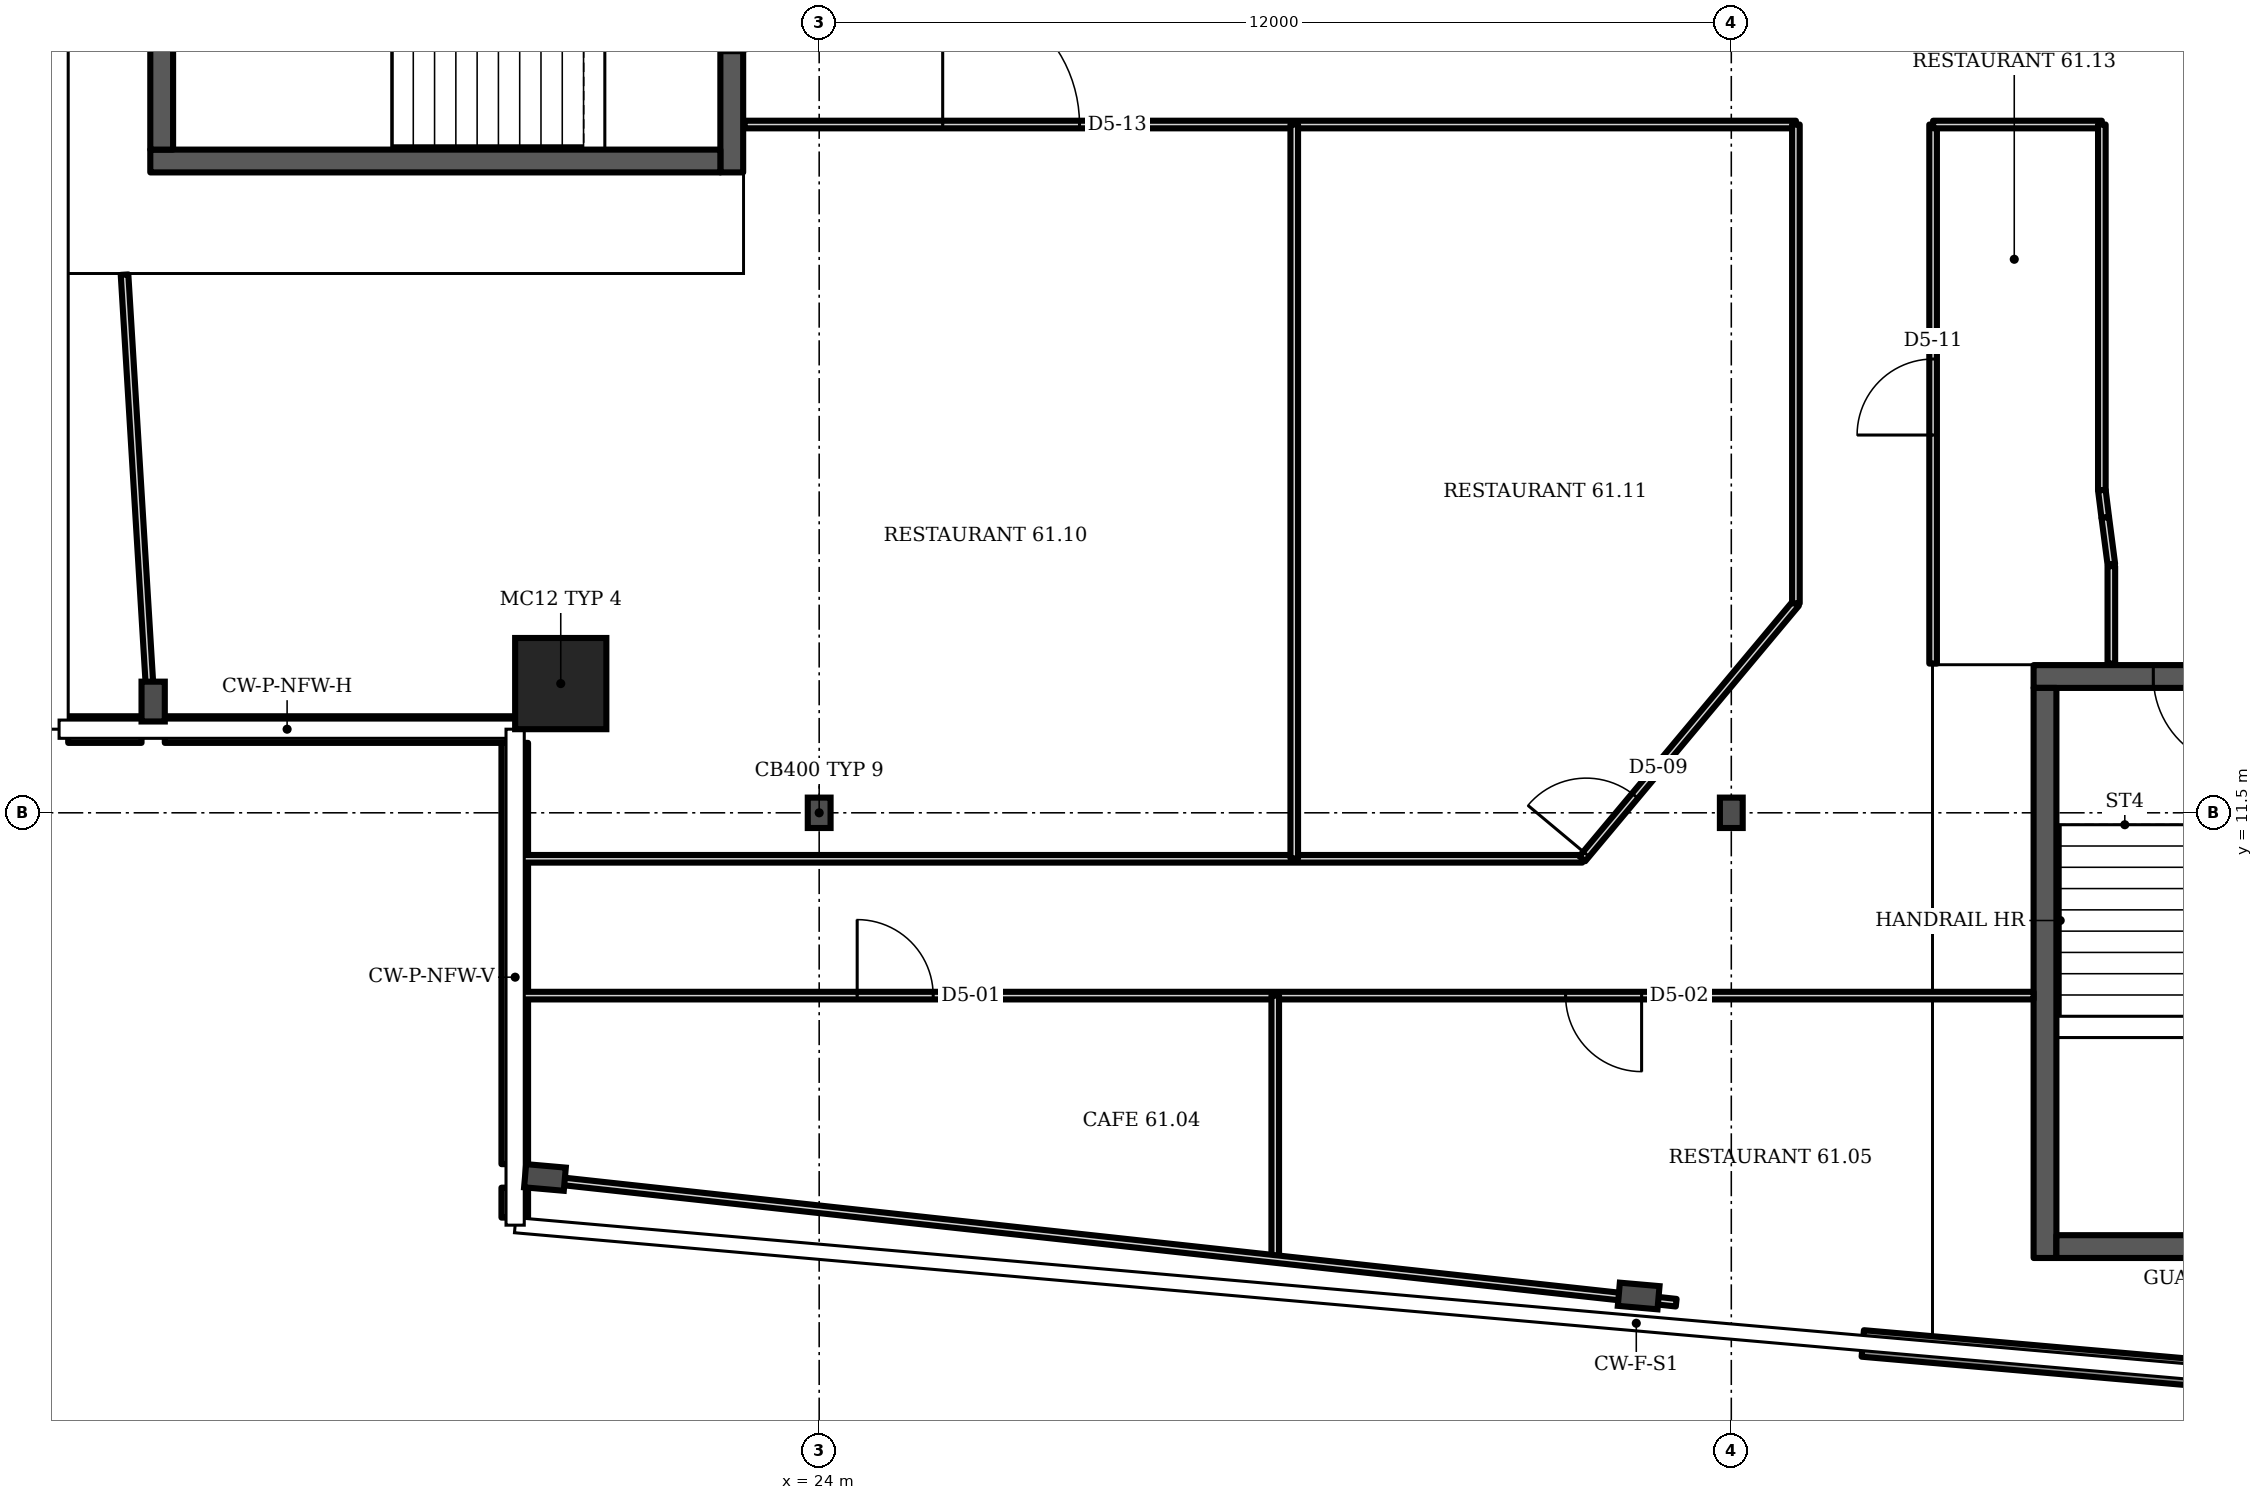
"""IFC4 building model, lengths in metres.
Left out: names, types, materials, properties, quantities, classifications, styles, units other than length and angle.
Written with IfcOpenShell. Run it as: python <this file> out.ifc"""

import sys

from ifc_helpers import new_model, si_unit, direction, frame, frame_2d, origin, origin_2d, place, context, subcontext, project, spatial, rectangle, i_section, extrude, element, fill, save


model = new_model("IFC4")
c1 = context("Model", 3, precision=1e-05, world=origin(), true_north=direction((0.0, 1.0)))
c2 = subcontext(c1, "Body", "Model", "MODEL_VIEW")
j1 = project(units=[si_unit("LENGTHUNIT", "METRE"), si_unit("PLANEANGLEUNIT", "RADIAN")], contexts=[c1])
p1 = place(None, origin())
s1 = spatial("IfcSite", under=j1, at=p1, CompositionType="ELEMENT")
p2 = place(p1, origin())
s2 = spatial("IfcBuilding", under=s1, at=p2, CompositionType="ELEMENT")
p3 = place(p2, frame((0.0, 0.0, 243.1)))
s3 = spatial("IfcBuildingStorey", under=s2, at=p3, CompositionType="ELEMENT", Elevation=243.1)
p4 = place(p3, frame((20.6, 13.2, 0.0), z_axis=(0.0, 0.0, 1.0), x_axis=(1.0, 0.0, 0.0)))
e1 = element("IfcColumn", 1, at=p4, inside=s3, PredefinedType="COLUMN", context=c2, shape_type="SweptSolid", body=[
    extrude(rectangle(XDim=1.2, YDim=1.2, at=origin_2d()), origin(), (0.0, 0.0, 1.0), 3.6),
])
for number, where, z_axis, x_axis in (
    (2, (20.392, 6.703, 0.0), (0.0, 0.0, 1.0), (-0.087, -0.996, 0.0)),
    (3, (34.781, 5.143, 0.0), (0.0, 0.0, 1.0), (-0.087, -0.996, 0.0)),
    (4, (15.238, 12.963, 0.0), (0.0, 0.0, 1.0), (-1.0, 0.0, 0.0)),
):
    element("IfcColumn", number, at=place(p3, frame(where, z_axis=z_axis, x_axis=x_axis)), inside=s3, PredefinedType="COLUMN", context=c2, shape_type="SweptSolid", body=[
        extrude(i_section(OverallWidth=0.306, OverallDepth=0.524, WebThickness=0.021, FlangeThickness=0.04, FilletRadius=0.027, at=origin_2d()), origin(), (0.0, 0.0, 1.0), 3.6),
    ])
for number, where, z_axis, x_axis in (
    (5, (24.0, 11.5, 0.0), (0.0, 0.0, 1.0), (1.0, 0.0, 0.0)),
    (6, (36.0, 11.5, 0.0), (0.0, 0.0, 1.0), (1.0, 0.0, 0.0)),
):
    element("IfcColumn", number, at=place(p3, frame(where, z_axis=z_axis, x_axis=x_axis)), inside=s3, PredefinedType="COLUMN", context=c2, shape_type="SweptSolid", body=[
        extrude(i_section(OverallWidth=0.3, OverallDepth=0.4, WebThickness=0.013, FlangeThickness=0.024, FilletRadius=0.027, at=origin_2d()), origin(), (0.0, 0.0, 1.0), 3.6),
    ])
p5 = place(p3, frame((37.729, 4.519, 0.0), z_axis=(0.0, 0.0, 1.0), x_axis=(0.99619, -0.087167, 0.0)))
e7 = element("IfcWall", 7, at=p5, inside=s3, PredefinedType="SOLIDWALL", context=c2, shape_type="SweptSolid", body=[
    extrude(rectangle(XDim=11.831, YDim=0.35, at=frame_2d((5.915, 0.0))), origin(), (0.0, 0.0, 1.0), 1.0),
])
p6 = place(p3, frame((14.12, 12.595, 0.0), z_axis=(0.0, 0.0, 1.0), x_axis=(1.0, 0.0, 0.0)))
e8 = element("IfcWall", 8, at=p6, inside=s3, PredefinedType="SOLIDWALL", context=c2, shape_type="SweptSolid", body=[
    extrude(rectangle(XDim=0.965, YDim=0.35, at=frame_2d((0.482, 0.0))), origin(), (0.0, 0.0, 1.0), 1.0),
])
p7 = place(p3, frame((15.391, 12.595, 0.0), z_axis=(0.0, 0.0, 1.0), x_axis=(1.0, 0.0, 0.0)))
e9 = element("IfcWall", 9, at=p7, inside=s3, PredefinedType="SOLIDWALL", context=c2, shape_type="SweptSolid", body=[
    extrude(rectangle(XDim=4.609, YDim=0.35, at=frame_2d((2.305, 0.0))), origin(), (0.0, 0.0, 1.0), 1.0),
])
p8 = place(p3, frame((19.995, 12.42, 0.0), z_axis=(0.0, 0.0, 1.0), x_axis=(0.0, -1.0, 0.0)))
e10 = element("IfcWall", 10, at=p8, inside=s3, PredefinedType="SOLIDWALL", context=c2, shape_type="SweptSolid", body=[
    extrude(rectangle(XDim=5.542, YDim=0.35, at=frame_2d((2.771, 0.0))), origin(), (0.0, 0.0, 1.0), 1.0),
])
p9 = place(p3, frame((19.995, 6.568, 0.0), z_axis=(0.0, 0.0, 1.0), x_axis=(0.0, -1.0, 0.0)))
e11 = element("IfcWall", 11, at=p9, inside=s3, PredefinedType="SOLIDWALL", context=c2, shape_type="SweptSolid", body=[
    extrude(rectangle(XDim=0.394, YDim=0.35, at=frame_2d((0.197, 0.0))), origin(), (0.0, 0.0, 1.0), 1.0),
])
p10 = place(p3, frame((22.85, 19.925, 0.0), z_axis=(0.0, 0.0, 1.0), x_axis=(0.0, 1.0, 0.0)))
e12 = element("IfcWall", 12, at=p10, inside=s3, PredefinedType="SHEAR", context=c2, shape_type="SweptSolid", body=[
    extrude(rectangle(XDim=4.35, YDim=0.3, at=frame_2d((2.175, 0.0))), origin(), (0.0, 0.0, 1.0), 3.2),
])
p11 = place(p10, frame((1.575, 0.0, 0.0)))
e13 = element("IfcOpeningElement", 13, at=p11, cuts=e12, PredefinedType="OPENING", context=c2, shape_type="SweptSolid", body=[
    extrude(rectangle(XDim=1.2, YDim=2.1, at=frame_2d((0.6, 1.05))), frame((0.0, 0.16, 0.0), z_axis=(0.0, -1.0, 0.0), x_axis=(1.0, 0.0, 0.0)), (0.0, 0.0, 1.0), 0.32),
])
p12 = place(p3, frame((39.977, 13.293, 0.0), z_axis=(0.0, 0.0, 1.0), x_axis=(1.0, 0.0, 0.0)))
e14 = element("IfcWall", 14, at=p12, inside=s3, PredefinedType="SHEAR", context=c2, shape_type="SweptSolid", body=[
    extrude(rectangle(XDim=4.35, YDim=0.3, at=frame_2d((2.175, 0.0))), origin(), (0.0, 0.0, 1.0), 3.2),
])
p13 = place(p12, frame((1.575, 0.0, 0.0)))
e15 = element("IfcOpeningElement", 15, at=p13, cuts=e14, PredefinedType="OPENING", context=c2, shape_type="SweptSolid", body=[
    extrude(rectangle(XDim=1.2, YDim=2.1, at=frame_2d((0.6, 1.05))), frame((0.0, 0.16, 0.0), z_axis=(0.0, -1.0, 0.0), x_axis=(1.0, 0.0, 0.0)), (0.0, 0.0, 1.0), 0.32),
])
p14 = place(p3, frame((15.224, 12.62, 0.0), z_axis=(0.0, 0.0, 1.0), x_axis=(-0.060759, 0.998149, 0.0)))
e16 = element("IfcWall", 16, at=p14, inside=s3, PredefinedType="PARTITIONING", context=c2, shape_type="SweptSolid", body=[
    extrude(rectangle(XDim=5.971, YDim=0.1, at=frame_2d((2.985, 0.0))), origin(), (0.0, 0.0, 1.0), 2.58),
])
p15 = place(p3, frame((20.02, 9.095, 0.0), z_axis=(0.0, 0.0, 1.0), x_axis=(1.0, 0.0, 0.0)))
e17 = element("IfcWall", 17, at=p15, inside=s3, PredefinedType="PARTITIONING", context=c2, shape_type="SweptSolid", body=[
    extrude(rectangle(XDim=19.957, YDim=0.1, at=frame_2d((9.979, 0.0))), origin(), (0.0, 0.0, 1.0), 3.2),
])
p16 = place(p15, frame((4.48, 0.0, 0.0)))
e18 = element("IfcOpeningElement", 18, at=p16, cuts=e17, PredefinedType="OPENING", context=c2, shape_type="SweptSolid", body=[
    extrude(rectangle(XDim=1.0, YDim=2.1, at=frame_2d((0.5, 1.05))), frame((0.0, 0.06, 0.0), z_axis=(0.0, -1.0, 0.0), x_axis=(1.0, 0.0, 0.0)), (0.0, 0.0, 1.0), 0.12),
])
p17 = place(p15, frame((13.8, 0.0, 0.0)))
e19 = element("IfcOpeningElement", 19, at=p17, cuts=e17, PredefinedType="OPENING", context=c2, shape_type="SweptSolid", body=[
    extrude(rectangle(XDim=1.0, YDim=2.1, at=frame_2d((0.5, 1.05))), frame((0.0, 0.06, 0.0), z_axis=(0.0, -1.0, 0.0), x_axis=(1.0, 0.0, 0.0)), (0.0, 0.0, 1.0), 0.12),
])
p18 = place(p3, frame((20.02, 10.895, 0.0), z_axis=(0.0, 0.0, 1.0), x_axis=(1.0, 0.0, 0.0)))
e20 = element("IfcWall", 20, at=p18, inside=s3, PredefinedType="PARTITIONING", context=c2, shape_type="SweptSolid", body=[
    extrude(rectangle(XDim=14.02, YDim=0.1, at=frame_2d((7.01, 0.0))), origin(), (0.0, 0.0, 1.0), 3.2),
])
p19 = place(p3, frame((23.02, 20.555, 0.0), z_axis=(0.0, 0.0, 1.0), x_axis=(1.0, 0.0, 0.0)))
e21 = element("IfcWall", 21, at=p19, inside=s3, PredefinedType="PARTITIONING", context=c2, shape_type="SweptSolid", body=[
    extrude(rectangle(XDim=13.83, YDim=0.1, at=frame_2d((6.915, 0.0))), origin(), (0.0, 0.0, 1.0), 3.2),
])
p20 = place(p19, frame((2.605, 0.0, 0.0)))
e22 = element("IfcOpeningElement", 22, at=p20, cuts=e21, PredefinedType="OPENING", context=c2, shape_type="SweptSolid", body=[
    extrude(rectangle(XDim=1.8, YDim=2.1, at=frame_2d((0.9, 1.05))), frame((0.0, 0.06, 0.0), z_axis=(0.0, -1.0, 0.0), x_axis=(1.0, 0.0, 0.0)), (0.0, 0.0, 1.0), 0.12),
])
p21 = place(p3, frame((30.0, 5.63, 0.0), z_axis=(0.0, 0.0, 1.0), x_axis=(0.0, 1.0, 0.0)))
e23 = element("IfcWall", 23, at=p21, inside=s3, PredefinedType="PARTITIONING", context=c2, shape_type="SweptSolid", body=[
    extrude(rectangle(XDim=3.465, YDim=0.1, at=frame_2d((1.732, 0.0))), origin(), (0.0, 0.0, 1.0), 3.2),
])
p22 = place(p3, frame((30.25, 10.9, 0.0), z_axis=(0.0, 0.0, 1.0), x_axis=(0.0, 1.0, 0.0)))
e24 = element("IfcWall", 24, at=p22, inside=s3, PredefinedType="PARTITIONING", context=c2, shape_type="SweptSolid", body=[
    extrude(rectangle(XDim=9.655, YDim=0.1, at=frame_2d((4.828, 0.0))), origin(), (0.0, 0.0, 1.0), 3.2),
])
p23 = place(p3, frame((34.04, 10.895, 0.0), z_axis=(0.0, 0.0, 1.0), x_axis=(0.641555, 0.767079, 0.0)))
e25 = element("IfcWall", 25, at=p23, inside=s3, PredefinedType="PARTITIONING", context=c2, shape_type="SweptSolid", body=[
    extrude(rectangle(XDim=4.38, YDim=0.1, at=frame_2d((2.19, 0.0))), origin(), (0.0, 0.0, 1.0), 3.2),
])
p24 = place(p23, frame((0.08, 0.0, 0.0)))
e26 = element("IfcOpeningElement", 26, at=p24, cuts=e25, PredefinedType="OPENING", context=c2, shape_type="SweptSolid", body=[
    extrude(rectangle(XDim=1.0, YDim=2.1, at=frame_2d((0.5, 1.05))), frame((0.0, 0.06, 0.0), z_axis=(0.0, -1.0, 0.0), x_axis=(1.0, 0.0, 0.0)), (0.0, 0.0, 1.0), 0.12),
])
p25 = place(p3, frame((35.275, 5.055, 0.0), z_axis=(0.0, 0.0, 1.0), x_axis=(-0.994114, 0.108368, 0.0)))
e27 = element("IfcWall", 27, at=p25, inside=s3, PredefinedType="PARTITIONING", context=c2, shape_type="SweptSolid", body=[
    extrude(rectangle(XDim=15.335, YDim=0.1, at=frame_2d((7.668, 0.0))), origin(), (0.0, 0.0, 1.0), 2.58),
])
p26 = place(p3, frame((36.85, 14.255, 0.0), z_axis=(0.0, 0.0, 1.0), x_axis=(0.0, 1.0, 0.0)))
e28 = element("IfcWall", 28, at=p26, inside=s3, PredefinedType="PARTITIONING", context=c2, shape_type="SweptSolid", body=[
    extrude(rectangle(XDim=6.3, YDim=0.1, at=frame_2d((3.15, 0.0))), origin(), (0.0, 0.0, 1.0), 3.2),
])
p27 = place(p3, frame((38.655, 13.463, 0.0), z_axis=(0.0, 0.0, 1.0), x_axis=(0.0, 1.0, 0.0)))
e29 = element("IfcWall", 29, at=p27, inside=s3, PredefinedType="PARTITIONING", context=c2, shape_type="SweptSolid", body=[
    extrude(rectangle(XDim=7.092, YDim=0.1, at=frame_2d((3.546, 0.0))), origin(), (0.0, 0.0, 1.0), 3.2),
])
p28 = place(p27, frame((3.007, 0.0, 0.0)))
e30 = element("IfcOpeningElement", 30, at=p28, cuts=e29, PredefinedType="OPENING", context=c2, shape_type="SweptSolid", body=[
    extrude(rectangle(XDim=1.0, YDim=2.1, at=frame_2d((0.5, 1.05))), frame((0.0, 0.06, 0.0), z_axis=(0.0, -1.0, 0.0), x_axis=(1.0, 0.0, 0.0)), (0.0, 0.0, 1.0), 0.12),
])
p29 = place(p3, frame((38.655, 20.555, 0.0), z_axis=(0.0, 0.0, 1.0), x_axis=(1.0, 0.0, 0.0)))
e31 = element("IfcWall", 31, at=p29, inside=s3, PredefinedType="PARTITIONING", context=c2, shape_type="SweptSolid", body=[
    extrude(rectangle(XDim=2.22, YDim=0.1, at=frame_2d((1.11, 0.0))), origin(), (0.0, 0.0, 1.0), 3.2),
])
p30 = place(p3, frame((40.875, 15.745, 0.0), z_axis=(0.0, 0.0, 1.0), x_axis=(0.0, 1.0, 0.0)))
e32 = element("IfcWall", 32, at=p30, inside=s3, PredefinedType="PARTITIONING", context=c2, shape_type="SweptSolid", body=[
    extrude(rectangle(XDim=4.81, YDim=0.1, at=frame_2d((2.405, 0.0))), origin(), (0.0, 0.0, 1.0), 3.2),
])
p31 = place(p3, frame((40.92, 15.385, 0.0), z_axis=(0.0, 0.0, 1.0), x_axis=(-0.123786, 0.992306, 0.0)))
e33 = element("IfcWall", 33, at=p31, inside=s3, PredefinedType="PARTITIONING", context=c2, shape_type="SweptSolid", body=[
    extrude(rectangle(XDim=0.363, YDim=0.1, at=frame_2d((0.181, 0.0))), origin(), (0.0, 0.0, 1.0), 3.2),
])
p32 = place(p3, frame((41.0, 14.77, 0.0), z_axis=(0.0, 0.0, 1.0), x_axis=(-0.12912, 0.991626, 0.0)))
e34 = element("IfcWall", 34, at=p32, inside=s3, PredefinedType="PARTITIONING", context=c2, shape_type="SweptSolid", body=[
    extrude(rectangle(XDim=0.62, YDim=0.1, at=frame_2d((0.31, 0.0))), origin(), (0.0, 0.0, 1.0), 3.2),
])
p33 = place(p3, frame((41.0, 13.463, 0.0), z_axis=(0.0, 0.0, 1.0), x_axis=(0.0, 1.0, 0.0)))
e35 = element("IfcWall", 35, at=p33, inside=s3, PredefinedType="PARTITIONING", context=c2, shape_type="SweptSolid", body=[
    extrude(rectangle(XDim=1.282, YDim=0.1, at=frame_2d((0.641, 0.0))), origin(), (0.0, 0.0, 1.0), 3.2),
])
p34 = place(p3, frame((15.2, 20.075, 0.0), z_axis=(0.0, 0.0, 1.0), x_axis=(1.0, 0.0, 0.0)))
e36 = element("IfcWall", 36, at=p34, inside=s3, PredefinedType="SHEAR", context=c2, shape_type="SweptSolid", body=[
    extrude(rectangle(XDim=7.5, YDim=0.3, at=frame_2d((3.75, 0.0))), origin(), (0.0, 0.0, 1.0), 3.2),
])
p35 = place(p3, frame((15.35, 20.225, 0.0), z_axis=(0.0, 0.0, 1.0), x_axis=(0.0, 1.0, 0.0)))
e37 = element("IfcWall", 37, at=p35, inside=s3, PredefinedType="SHEAR", context=c2, shape_type="SweptSolid", body=[
    extrude(rectangle(XDim=3.75, YDim=0.3, at=frame_2d((1.875, 0.0))), origin(), (0.0, 0.0, 1.0), 3.2),
])
p36 = place(p3, frame((40.127, 5.643, 0.0), z_axis=(0.0, 0.0, 1.0), x_axis=(0.0, 1.0, 0.0)))
e38 = element("IfcWall", 38, at=p36, inside=s3, PredefinedType="SHEAR", context=c2, shape_type="SweptSolid", body=[
    extrude(rectangle(XDim=7.5, YDim=0.3, at=frame_2d((3.75, 0.0))), origin(), (0.0, 0.0, 1.0), 3.2),
])
p37 = place(p3, frame((40.277, 5.793, 0.0), z_axis=(0.0, 0.0, 1.0), x_axis=(1.0, 0.0, 0.0)))
e39 = element("IfcWall", 39, at=p37, inside=s3, PredefinedType="SHEAR", context=c2, shape_type="SweptSolid", body=[
    extrude(rectangle(XDim=3.75, YDim=0.3, at=frame_2d((1.875, 0.0))), origin(), (0.0, 0.0, 1.0), 3.2),
])
p38 = place(p11, origin())
e40 = element("IfcDoor", 40, at=p38, inside=s3, OperationType="SINGLE_SWING_RIGHT", PredefinedType="DOOR", context=c2, shape_type="SweptSolid", body=[
    extrude(rectangle(XDim=1.2, YDim=2.1, at=frame_2d((0.6, 1.05))), frame((0.0, 0.025, 0.0), z_axis=(0.0, -1.0, 0.0), x_axis=(1.0, 0.0, 0.0)), (0.0, 0.0, 1.0), 0.05),
])
fill(e13, e40)
p39 = place(p13, origin())
e41 = element("IfcDoor", 41, at=p39, inside=s3, OperationType="SINGLE_SWING_RIGHT", PredefinedType="DOOR", context=c2, shape_type="SweptSolid", body=[
    extrude(rectangle(XDim=1.2, YDim=2.1, at=frame_2d((0.6, 1.05))), frame((0.0, 0.025, 0.0), z_axis=(0.0, -1.0, 0.0), x_axis=(1.0, 0.0, 0.0)), (0.0, 0.0, 1.0), 0.05),
])
fill(e15, e41)
p40 = place(p16, origin())
e42 = element("IfcDoor", 42, at=p40, inside=s3, OperationType="SINGLE_SWING_LEFT", PredefinedType="DOOR", context=c2, shape_type="SweptSolid", body=[
    extrude(rectangle(XDim=1.0, YDim=2.1, at=frame_2d((0.5, 1.05))), frame((0.0, 0.025, 0.0), z_axis=(0.0, -1.0, 0.0), x_axis=(1.0, 0.0, 0.0)), (0.0, 0.0, 1.0), 0.05),
])
fill(e18, e42)
p41 = place(p17, origin())
e43 = element("IfcDoor", 43, at=p41, inside=s3, OperationType="SINGLE_SWING_RIGHT", PredefinedType="DOOR", context=c2, shape_type="SweptSolid", body=[
    extrude(rectangle(XDim=1.0, YDim=2.1, at=frame_2d((0.5, 1.05))), frame((0.0, 0.025, 0.0), z_axis=(0.0, -1.0, 0.0), x_axis=(1.0, 0.0, 0.0)), (0.0, 0.0, 1.0), 0.05),
])
fill(e19, e43)
p42 = place(p24, origin())
e44 = element("IfcDoor", 44, at=p42, inside=s3, OperationType="SINGLE_SWING_LEFT", PredefinedType="DOOR", context=c2, shape_type="SweptSolid", body=[
    extrude(rectangle(XDim=1.0, YDim=2.1, at=frame_2d((0.5, 1.05))), frame((0.0, 0.025, 0.0), z_axis=(0.0, -1.0, 0.0), x_axis=(1.0, 0.0, 0.0)), (0.0, 0.0, 1.0), 0.05),
])
fill(e26, e44)
p43 = place(p28, origin())
e45 = element("IfcDoor", 45, at=p43, inside=s3, OperationType="SINGLE_SWING_LEFT", PredefinedType="DOOR", context=c2, shape_type="SweptSolid", body=[
    extrude(rectangle(XDim=1.0, YDim=2.1, at=frame_2d((0.5, 1.05))), frame((0.0, 0.025, 0.0), z_axis=(0.0, -1.0, 0.0), x_axis=(1.0, 0.0, 0.0)), (0.0, 0.0, 1.0), 0.05),
])
fill(e30, e45)
p44 = place(p20, origin())
e46 = element("IfcDoor", 46, at=p44, inside=s3, OperationType="DOUBLE_DOOR_SINGLE_SWING", PredefinedType="DOOR", context=c2, shape_type="SweptSolid", body=[
    extrude(rectangle(XDim=1.8, YDim=2.1, at=frame_2d((0.9, 1.05))), frame((0.0, 0.025, 0.0), z_axis=(0.0, -1.0, 0.0), x_axis=(1.0, 0.0, 0.0)), (0.0, 0.0, 1.0), 0.05),
])
fill(e22, e46)
save(model, sys.argv[1])
